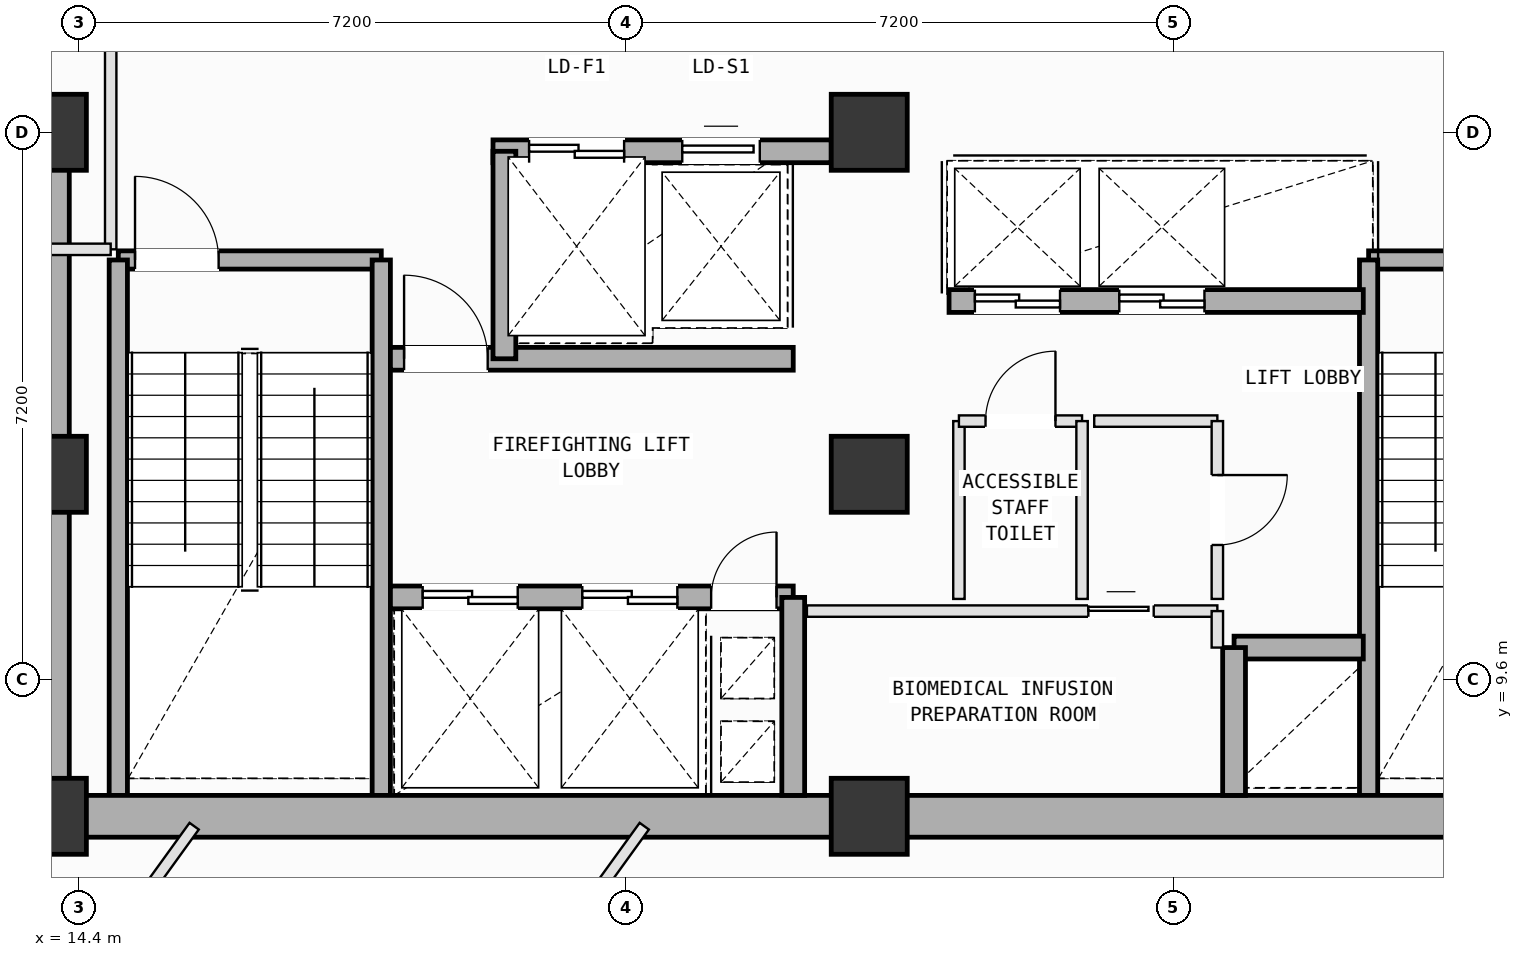
"""IFC4 building model, lengths in metres.
Left out: names, types, materials, properties, quantities, classifications, styles, units other than length and angle.
Written with IfcOpenShell. Run it as: python <this file> out.ifc"""

import sys

from ifc_helpers import new_model, si_unit, direction, frame, frame_2d, origin, origin_2d, place, context, subcontext, project, spatial, rectangle, extrude, element, fill, save


model = new_model("IFC4")
c1 = context("Model", 3, precision=1e-05, world=origin(), true_north=direction((0.0, 1.0)))
c2 = subcontext(c1, "Body", "Model", "MODEL_VIEW")
j1 = project(units=[si_unit("LENGTHUNIT", "METRE"), si_unit("PLANEANGLEUNIT", "RADIAN")], contexts=[c1])
p1 = place(None, origin())
s1 = spatial("IfcSite", under=j1, at=p1, CompositionType="ELEMENT")
p2 = place(p1, origin())
s2 = spatial("IfcBuilding", under=s1, at=p2, CompositionType="ELEMENT")
p3 = place(p2, frame((0.0, 0.0, 255.2)))
s3 = spatial("IfcBuildingStorey", under=s2, at=p3, CompositionType="ELEMENT", Elevation=255.2)
for number, where, z_axis, x_axis in (
    (1, (14.0, 7.8, 0.0), (0.0, 0.0, 1.0), (1.0, 0.0, 0.0)),
    (2, (14.0, 12.3, 0.0), (0.0, 0.0, 1.0), (1.0, 0.0, 0.0)),
    (3, (14.0, 16.8, 0.0), (0.0, 0.0, 1.0), (1.0, 0.0, 0.0)),
    (4, (24.8, 7.8, 0.0), (0.0, 0.0, 1.0), (1.0, 0.0, 0.0)),
    (5, (24.8, 12.3, 0.0), (0.0, 0.0, 1.0), (1.0, 0.0, 0.0)),
    (6, (24.8, 16.8, 0.0), (0.0, 0.0, 1.0), (1.0, 0.0, 0.0)),
):
    element("IfcColumn", number, at=place(p3, frame(where, z_axis=z_axis, x_axis=x_axis)), inside=s3, PredefinedType="COLUMN", context=c2, shape_type="SweptSolid", body=[
        extrude(rectangle(XDim=1.0, YDim=1.0, at=origin_2d()), origin(), (0.0, 0.0, 1.0), 4.0),
    ])
p4 = place(p3, frame((15.189, 4.237, 0.0), z_axis=(0.0, 0.0, 1.0), x_axis=(-0.810568140664, 0.585644336898, 0.0)))
e7 = element("IfcWall", 7, at=p4, inside=s3, PredefinedType="SOLIDWALL", context=c2, shape_type="SweptSolid", body=[
    extrude(rectangle(XDim=5.101, YDim=0.28, at=frame_2d((2.55, 0.0))), origin(), (0.0, 0.0, 1.0), 3.245),
])
p5 = place(p4, frame((2.644, 0.0, 0.75)))
e8 = element("IfcOpeningElement", 8, at=p5, cuts=e7, PredefinedType="OPENING", context=c2, shape_type="SweptSolid", body=[
    extrude(rectangle(XDim=1.6, YDim=1.95, at=frame_2d((0.8, 0.975))), frame((0.0, 0.15, 0.0), z_axis=(0.0, -1.0, 0.0), x_axis=(1.0, 0.0, 0.0)), (0.0, 0.0, 1.0), 0.3),
])
p6 = place(p3, frame((14.92, 15.12, 0.0), z_axis=(0.0, 0.0, 1.0), x_axis=(1.0, 0.0, 0.0)))
e9 = element("IfcWall", 9, at=p6, inside=s3, PredefinedType="SOLIDWALL", context=c2, shape_type="SweptSolid", body=[
    extrude(rectangle(XDim=3.46, YDim=0.24, at=frame_2d((1.73, 0.0))), origin(), (0.0, 0.0, 1.0), 3.78),
])
p7 = place(p6, frame((0.22, 0.0, 0.0)))
e10 = element("IfcOpeningElement", 10, at=p7, cuts=e9, PredefinedType="OPENING", context=c2, shape_type="SweptSolid", body=[
    extrude(rectangle(XDim=1.1, YDim=2.15, at=frame_2d((0.55, 1.075))), frame((0.0, 0.13, 0.0), z_axis=(0.0, -1.0, 0.0), x_axis=(1.0, 0.0, 0.0)), (0.0, 0.0, 1.0), 0.26),
])
for number, where, z_axis, x_axis in (
    (11, (18.38, 15.12, 0.0), (0.0, 0.0, 1.0), (0.0, -1.0, 0.0)),
    (12, (14.92, 8.075, 0.0), (0.0, 0.0, 1.0), (0.0, 1.0, 0.0)),
):
    element("IfcWall", number, at=place(p3, frame(where, z_axis=z_axis, x_axis=x_axis)), inside=s3, PredefinedType="SOLIDWALL", context=c2, shape_type="SweptSolid", body=[
        extrude(rectangle(XDim=7.045, YDim=0.24, at=frame_2d((3.522, 0.0))), origin(), (0.0, 0.0, 1.0), 3.78),
    ])
p8 = place(p3, frame((31.37, 15.12, 0.0), z_axis=(0.0, 0.0, 1.0), x_axis=(1.0, 0.0, 0.0)))
e13 = element("IfcWall", 13, at=p8, inside=s3, PredefinedType="SOLIDWALL", context=c2, shape_type="SweptSolid", body=[
    extrude(rectangle(XDim=3.46, YDim=0.24, at=frame_2d((1.73, 0.0))), origin(), (0.0, 0.0, 1.0), 3.78),
])
p9 = place(p8, frame((2.14, 0.0, 0.0)))
e14 = element("IfcOpeningElement", 14, at=p9, cuts=e13, PredefinedType="OPENING", context=c2, shape_type="SweptSolid", body=[
    extrude(rectangle(XDim=1.1, YDim=2.15, at=frame_2d((0.55, 1.075))), frame((0.0, 0.13, 0.0), z_axis=(0.0, -1.0, 0.0), x_axis=(1.0, 0.0, 0.0)), (0.0, 0.0, 1.0), 0.26),
])
p10 = place(p3, frame((31.37, 8.075, 0.0), z_axis=(0.0, 0.0, 1.0), x_axis=(0.0, 1.0, 0.0)))
e15 = element("IfcWall", 15, at=p10, inside=s3, PredefinedType="SOLIDWALL", context=c2, shape_type="SweptSolid", body=[
    extrude(rectangle(XDim=7.045, YDim=0.24, at=frame_2d((3.522, 0.0))), origin(), (0.0, 0.0, 1.0), 3.78),
])
for number, where, z_axis, x_axis in (
    (16, (14.0, 7.8, 0.0), (0.0, 0.0, 1.0), (1.0, 0.0, 0.0)),
    (17, (24.8, 7.8, 0.0), (0.0, 0.0, 1.0), (1.0, 0.0, 0.0)),
):
    element("IfcWall", number, at=place(p3, frame(where, z_axis=z_axis, x_axis=x_axis)), inside=s3, PredefinedType="SHEAR", context=c2, shape_type="SweptSolid", body=[
        extrude(rectangle(XDim=10.8, YDim=0.55, at=frame_2d((5.4, 0.0))), origin(), (0.0, 0.0, 1.0), 3.78),
    ])
p11 = place(p3, frame((14.0, 16.8, 0.0), z_axis=(0.0, 0.0, 1.0), x_axis=(0.0, -1.0, 0.0)))
e18 = element("IfcWall", 18, at=p11, inside=s3, PredefinedType="SHEAR", context=c2, shape_type="SweptSolid", body=[
    extrude(rectangle(XDim=9.0, YDim=0.55, at=frame_2d((4.5, 0.0))), origin(), (0.0, 0.0, 1.0), 3.78),
])
p12 = place(p3, frame((19.85, 16.55, 0.0), z_axis=(0.0, 0.0, 1.0), x_axis=(1.0, 0.0, 0.0)))
e19 = element("IfcWall", 19, at=p12, inside=s3, PredefinedType="SOLIDWALL", context=c2, shape_type="SweptSolid", body=[
    extrude(rectangle(XDim=4.45, YDim=0.3, at=frame_2d((2.225, 0.0))), origin(), (0.0, 0.0, 1.0), 3.78),
])
p13 = place(p12, frame((0.475, 0.0, 0.0)))
e20 = element("IfcOpeningElement", 20, at=p13, cuts=e19, PredefinedType="OPENING", context=c2, shape_type="SweptSolid", body=[
    extrude(rectangle(XDim=1.25, YDim=2.18, at=frame_2d((0.625, 1.09))), frame((0.0, 0.16, 0.0), z_axis=(0.0, -1.0, 0.0), x_axis=(1.0, 0.0, 0.0)), (0.0, 0.0, 1.0), 0.32),
])
p14 = place(p12, frame((2.49, 0.0, 0.0)))
e21 = element("IfcOpeningElement", 21, at=p14, cuts=e19, PredefinedType="OPENING", context=c2, shape_type="SweptSolid", body=[
    extrude(rectangle(XDim=1.02, YDim=2.12, at=frame_2d((0.51, 1.06))), frame((0.0, 0.16, 0.0), z_axis=(0.0, -1.0, 0.0), x_axis=(1.0, 0.0, 0.0)), (0.0, 0.0, 1.0), 0.32),
])
p15 = place(p3, frame((18.5, 10.68, 0.0), z_axis=(0.0, 0.0, 1.0), x_axis=(1.0, 0.0, 0.0)))
e22 = element("IfcWall", 22, at=p15, inside=s3, PredefinedType="SOLIDWALL", context=c2, shape_type="SweptSolid", body=[
    extrude(rectangle(XDim=5.3, YDim=0.3, at=frame_2d((2.65, 0.0))), origin(), (0.0, 0.0, 1.0), 3.78),
])
p16 = place(p15, frame((4.22, 0.0, 0.0)))
e23 = element("IfcOpeningElement", 23, at=p16, cuts=e22, PredefinedType="OPENING", context=c2, shape_type="SweptSolid", body=[
    extrude(rectangle(XDim=0.86, YDim=2.06, at=frame_2d((0.43, 1.03))), frame((0.0, 0.16, 0.0), z_axis=(0.0, -1.0, 0.0), x_axis=(1.0, 0.0, 0.0)), (0.0, 0.0, 1.0), 0.32),
])
p17 = place(p15, frame((0.425, 0.0, 0.0)))
e24 = element("IfcOpeningElement", 24, at=p17, cuts=e22, PredefinedType="OPENING", context=c2, shape_type="SweptSolid", body=[
    extrude(rectangle(XDim=1.25, YDim=2.18, at=frame_2d((0.625, 1.09))), frame((0.0, 0.16, 0.0), z_axis=(0.0, -1.0, 0.0), x_axis=(1.0, 0.0, 0.0)), (0.0, 0.0, 1.0), 0.32),
])
p18 = place(p15, frame((2.525, 0.0, 0.0)))
e25 = element("IfcOpeningElement", 25, at=p18, cuts=e22, PredefinedType="OPENING", context=c2, shape_type="SweptSolid", body=[
    extrude(rectangle(XDim=1.25, YDim=2.18, at=frame_2d((0.625, 1.09))), frame((0.0, 0.16, 0.0), z_axis=(0.0, -1.0, 0.0), x_axis=(1.0, 0.0, 0.0)), (0.0, 0.0, 1.0), 0.32),
])
p19 = place(p3, frame((18.5, 13.82, 0.0), z_axis=(0.0, 0.0, 1.0), x_axis=(1.0, 0.0, 0.0)))
e26 = element("IfcWall", 26, at=p19, inside=s3, PredefinedType="SOLIDWALL", context=c2, shape_type="SweptSolid", body=[
    extrude(rectangle(XDim=5.3, YDim=0.3, at=frame_2d((2.65, 0.0))), origin(), (0.0, 0.0, 1.0), 3.78),
])
p20 = place(p19, frame((0.18, 0.0, 0.0)))
e27 = element("IfcOpeningElement", 27, at=p20, cuts=e26, PredefinedType="OPENING", context=c2, shape_type="SweptSolid", body=[
    extrude(rectangle(XDim=1.1, YDim=2.15, at=frame_2d((0.55, 1.075))), frame((0.0, 0.16, 0.0), z_axis=(0.0, -1.0, 0.0), x_axis=(1.0, 0.0, 0.0)), (0.0, 0.0, 1.0), 0.32),
])
p21 = place(p3, frame((23.8, 8.075, 0.0), z_axis=(0.0, 0.0, 1.0), x_axis=(0.0, 1.0, 0.0)))
e28 = element("IfcWall", 28, at=p21, inside=s3, PredefinedType="SOLIDWALL", context=c2, shape_type="SweptSolid", body=[
    extrude(rectangle(XDim=2.605, YDim=0.3, at=frame_2d((1.302, 0.0))), origin(), (0.0, 0.0, 1.0), 3.78),
])
p22 = place(p3, frame((20.0, 13.82, 0.0), z_axis=(0.0, 0.0, 1.0), x_axis=(0.0, 1.0, 0.0)))
e29 = element("IfcWall", 29, at=p22, inside=s3, PredefinedType="SOLIDWALL", context=c2, shape_type="SweptSolid", body=[
    extrude(rectangle(XDim=2.73, YDim=0.3, at=frame_2d((1.365, 0.0))), origin(), (0.0, 0.0, 1.0), 3.78),
])
p23 = place(p3, frame((29.6, 10.02, 0.0), z_axis=(0.0, 0.0, 1.0), x_axis=(1.0, 0.0, 0.0)))
e30 = element("IfcWall", 30, at=p23, inside=s3, PredefinedType="SOLIDWALL", context=c2, shape_type="SweptSolid", body=[
    extrude(rectangle(XDim=1.7, YDim=0.3, at=frame_2d((0.85, 0.0))), origin(), (0.0, 0.0, 1.0), 3.78),
])
p24 = place(p3, frame((29.6, 8.075, 0.0), z_axis=(0.0, 0.0, 1.0), x_axis=(0.0, 1.0, 0.0)))
e31 = element("IfcWall", 31, at=p24, inside=s3, PredefinedType="SOLIDWALL", context=c2, shape_type="SweptSolid", body=[
    extrude(rectangle(XDim=1.945, YDim=0.3, at=frame_2d((0.973, 0.0))), origin(), (0.0, 0.0, 1.0), 3.78),
])
p25 = place(p3, frame((25.85, 14.58, 0.0), z_axis=(0.0, 0.0, 1.0), x_axis=(1.0, 0.0, 0.0)))
e32 = element("IfcWall", 32, at=p25, inside=s3, PredefinedType="SOLIDWALL", context=c2, shape_type="SweptSolid", body=[
    extrude(rectangle(XDim=5.45, YDim=0.3, at=frame_2d((2.725, 0.0))), origin(), (0.0, 0.0, 1.0), 3.78),
])
p26 = place(p25, frame((0.34, 0.0, 0.0)))
e33 = element("IfcOpeningElement", 33, at=p26, cuts=e32, PredefinedType="OPENING", context=c2, shape_type="SweptSolid", body=[
    extrude(rectangle(XDim=1.12, YDim=2.15, at=frame_2d((0.56, 1.075))), frame((0.0, 0.16, 0.0), z_axis=(0.0, -1.0, 0.0), x_axis=(1.0, 0.0, 0.0)), (0.0, 0.0, 1.0), 0.32),
])
p27 = place(p25, frame((2.24, 0.0, 0.0)))
e34 = element("IfcOpeningElement", 34, at=p27, cuts=e32, PredefinedType="OPENING", context=c2, shape_type="SweptSolid", body=[
    extrude(rectangle(XDim=1.12, YDim=2.15, at=frame_2d((0.56, 1.075))), frame((0.0, 0.16, 0.0), z_axis=(0.0, -1.0, 0.0), x_axis=(1.0, 0.0, 0.0)), (0.0, 0.0, 1.0), 0.32),
])
p28 = place(p3, frame((23.98, 10.5, 0.0), z_axis=(0.0, 0.0, 1.0), x_axis=(1.0, 0.0, 0.0)))
e35 = element("IfcWall", 35, at=p28, inside=s3, PredefinedType="PARTITIONING", context=c2, shape_type="SweptSolid", body=[
    extrude(rectangle(XDim=5.4, YDim=0.15, at=frame_2d((2.7, 0.0))), origin(), (0.0, 0.0, 1.0), 3.78),
])
p29 = place(p28, frame((3.703, 0.0, 0.0)))
e36 = element("IfcOpeningElement", 36, at=p29, cuts=e35, PredefinedType="OPENING", context=c2, shape_type="SweptSolid", body=[
    extrude(rectangle(XDim=0.86, YDim=2.06, at=frame_2d((0.43, 1.03))), frame((0.0, 0.085, 0.0), z_axis=(0.0, -1.0, 0.0), x_axis=(1.0, 0.0, 0.0)), (0.0, 0.0, 1.0), 0.17),
])
p30 = place(p3, frame((29.38, 10.5, 0.0), z_axis=(0.0, 0.0, 1.0), x_axis=(0.0, -1.0, 0.0)))
e37 = element("IfcWall", 37, at=p30, inside=s3, PredefinedType="PARTITIONING", context=c2, shape_type="SweptSolid", body=[
    extrude(rectangle(XDim=0.48, YDim=0.15, at=frame_2d((0.24, 0.0))), origin(), (0.0, 0.0, 1.0), 3.78),
])
p31 = place(p3, frame((25.98, 10.66, 0.0), z_axis=(0.0, 0.0, 1.0), x_axis=(0.0, 1.0, 0.0)))
e38 = element("IfcWall", 38, at=p31, inside=s3, PredefinedType="PARTITIONING", context=c2, shape_type="SweptSolid", body=[
    extrude(rectangle(XDim=2.34, YDim=0.15, at=frame_2d((1.17, 0.0))), origin(), (0.0, 0.0, 1.0), 3.78),
])
p32 = place(p3, frame((25.98, 13.0, 0.0), z_axis=(0.0, 0.0, 1.0), x_axis=(1.0, 0.0, 0.0)))
e39 = element("IfcWall", 39, at=p32, inside=s3, PredefinedType="PARTITIONING", context=c2, shape_type="SweptSolid", body=[
    extrude(rectangle(XDim=1.62, YDim=0.15, at=frame_2d((0.81, 0.0))), origin(), (0.0, 0.0, 1.0), 3.78),
])
p33 = place(p32, frame((0.35, 0.0, 0.0)))
e40 = element("IfcOpeningElement", 40, at=p33, cuts=e39, PredefinedType="OPENING", context=c2, shape_type="SweptSolid", body=[
    extrude(rectangle(XDim=0.92, YDim=2.1, at=frame_2d((0.46, 1.05))), frame((0.0, 0.085, 0.0), z_axis=(0.0, -1.0, 0.0), x_axis=(1.0, 0.0, 0.0)), (0.0, 0.0, 1.0), 0.17),
])
p34 = place(p3, frame((27.6, 13.0, 0.0), z_axis=(0.0, 0.0, 1.0), x_axis=(0.0, -1.0, 0.0)))
e41 = element("IfcWall", 41, at=p34, inside=s3, PredefinedType="PARTITIONING", context=c2, shape_type="SweptSolid", body=[
    extrude(rectangle(XDim=2.34, YDim=0.15, at=frame_2d((1.17, 0.0))), origin(), (0.0, 0.0, 1.0), 3.78),
])
p35 = place(p3, frame((27.76, 13.0, 0.0), z_axis=(0.0, 0.0, 1.0), x_axis=(1.0, 0.0, 0.0)))
e42 = element("IfcWall", 42, at=p35, inside=s3, PredefinedType="PARTITIONING", context=c2, shape_type="SweptSolid", body=[
    extrude(rectangle(XDim=1.62, YDim=0.15, at=frame_2d((0.81, 0.0))), origin(), (0.0, 0.0, 1.0), 3.78),
])
p36 = place(p3, frame((29.38, 13.0, 0.0), z_axis=(0.0, 0.0, 1.0), x_axis=(0.0, -1.0, 0.0)))
e43 = element("IfcWall", 43, at=p36, inside=s3, PredefinedType="PARTITIONING", context=c2, shape_type="SweptSolid", body=[
    extrude(rectangle(XDim=2.34, YDim=0.15, at=frame_2d((1.17, 0.0))), origin(), (0.0, 0.0, 1.0), 3.78),
])
p37 = place(p36, frame((0.71, 0.0, 0.0)))
e44 = element("IfcOpeningElement", 44, at=p37, cuts=e43, PredefinedType="OPENING", context=c2, shape_type="SweptSolid", body=[
    extrude(rectangle(XDim=0.92, YDim=2.1, at=frame_2d((0.46, 1.05))), frame((0.0, 0.085, 0.0), z_axis=(0.0, -1.0, 0.0), x_axis=(1.0, 0.0, 0.0)), (0.0, 0.0, 1.0), 0.17),
])
p38 = place(p3, frame((33.363, 7.5, 0.0), z_axis=(0.0, 0.0, 1.0), x_axis=(-0.585650908252, -0.810563392748, 0.0)))
e45 = element("IfcWall", 45, at=p38, inside=s3, PredefinedType="PARTITIONING", context=c2, shape_type="SweptSolid", body=[
    extrude(rectangle(XDim=13.174, YDim=0.15, at=frame_2d((6.587, 0.0))), origin(), (0.0, 0.0, 1.0), 3.78),
])
p39 = place(p3, frame((19.768, 4.803, 0.0), z_axis=(0.0, 0.0, 1.0), x_axis=(0.585760155667, 0.810484447743, 0.0)))
e46 = element("IfcWall", 46, at=p39, inside=s3, PredefinedType="PARTITIONING", context=c2, shape_type="SweptSolid", body=[
    extrude(rectangle(XDim=3.537, YDim=0.15, at=frame_2d((1.769, 0.0))), origin(), (0.0, 0.0, 1.0), 3.78),
])
p40 = place(p39, frame((1.234, 0.0, 0.0)))
e47 = element("IfcOpeningElement", 47, at=p40, cuts=e46, PredefinedType="OPENING", context=c2, shape_type="SweptSolid", body=[
    extrude(rectangle(XDim=0.86, YDim=2.06, at=frame_2d((0.43, 1.03))), frame((0.0, 0.085, 0.0), z_axis=(0.0, -1.0, 0.0), x_axis=(1.0, 0.0, 0.0)), (0.0, 0.0, 1.0), 0.17),
])
p41 = place(p3, frame((14.105, 5.162, 0.0), z_axis=(0.0, 0.0, 1.0), x_axis=(0.585870719432, 0.810404528684, 0.0)))
e48 = element("IfcWall", 48, at=p41, inside=s3, PredefinedType="PARTITIONING", context=c2, shape_type="SweptSolid", body=[
    extrude(rectangle(XDim=3.094, YDim=0.15, at=frame_2d((1.547, 0.0))), origin(), (0.0, 0.0, 1.0), 3.78),
])
p42 = place(p41, frame((0.529, 0.0, 0.0)))
e49 = element("IfcOpeningElement", 49, at=p42, cuts=e48, PredefinedType="OPENING", context=c2, shape_type="SweptSolid", body=[
    extrude(rectangle(XDim=0.86, YDim=2.06, at=frame_2d((0.43, 1.03))), frame((0.0, 0.085, 0.0), z_axis=(0.0, -1.0, 0.0), x_axis=(1.0, 0.0, 0.0)), (0.0, 0.0, 1.0), 0.17),
])
p43 = place(p3, frame((14.82, 18.2, 0.0), z_axis=(0.0, 0.0, 1.0), x_axis=(0.0, -1.0, 0.0)))
e50 = element("IfcWall", 50, at=p43, inside=s3, PredefinedType="PARTITIONING", context=c2, shape_type="SweptSolid", body=[
    extrude(rectangle(XDim=2.94, YDim=0.15, at=frame_2d((1.47, 0.0))), origin(), (0.0, 0.0, 1.0), 3.78),
])
p44 = place(p3, frame((14.82, 15.26, 0.0), z_axis=(0.0, 0.0, 1.0), x_axis=(-1.0, 0.0, 0.0)))
e51 = element("IfcWall", 51, at=p44, inside=s3, PredefinedType="PARTITIONING", context=c2, shape_type="SweptSolid", body=[
    extrude(rectangle(XDim=1.12, YDim=0.15, at=frame_2d((0.56, 0.0))), origin(), (0.0, 0.0, 1.0), 3.78),
])
p45 = place(p3, frame((6.324, 10.784, 0.0), z_axis=(0.0, 0.0, 1.0), x_axis=(0.585687308948, 0.810537091155, 0.0)))
e52 = element("IfcWall", 52, at=p45, inside=s3, PredefinedType="PARTITIONING", context=c2, shape_type="SweptSolid", body=[
    extrude(rectangle(XDim=13.635, YDim=0.15, at=frame_2d((6.818, 0.0))), origin(), (0.0, 0.0, 1.0), 3.78),
])
p46 = place(p7, origin())
e53 = element("IfcDoor", 53, at=p46, inside=s3, OperationType="SINGLE_SWING_LEFT", PredefinedType="DOOR", context=c2, shape_type="SweptSolid", body=[
    extrude(rectangle(XDim=1.1, YDim=2.15, at=frame_2d((0.55, 1.075))), frame((0.0, 0.025, 0.0), z_axis=(0.0, -1.0, 0.0), x_axis=(1.0, 0.0, 0.0)), (0.0, 0.0, 1.0), 0.05),
])
fill(e10, e53)
p47 = place(p16, origin())
e54 = element("IfcDoor", 54, at=p47, inside=s3, OperationType="SINGLE_SWING_RIGHT", PredefinedType="DOOR", context=c2, shape_type="SweptSolid", body=[
    extrude(rectangle(XDim=0.86, YDim=2.06, at=frame_2d((0.43, 1.03))), frame((0.0, 0.025, 0.0), z_axis=(0.0, -1.0, 0.0), x_axis=(1.0, 0.0, 0.0)), (0.0, 0.0, 1.0), 0.05),
])
fill(e23, e54)
p48 = place(p20, origin())
e55 = element("IfcDoor", 55, at=p48, inside=s3, OperationType="SINGLE_SWING_LEFT", PredefinedType="DOOR", context=c2, shape_type="SweptSolid", body=[
    extrude(rectangle(XDim=1.1, YDim=2.15, at=frame_2d((0.55, 1.075))), frame((0.0, 0.025, 0.0), z_axis=(0.0, -1.0, 0.0), x_axis=(1.0, 0.0, 0.0)), (0.0, 0.0, 1.0), 0.05),
])
fill(e27, e55)
p49 = place(p17, origin())
e56 = element("IfcDoor", 56, at=p49, inside=s3, OperationType="DOUBLE_DOOR_SLIDING", PredefinedType="DOOR", context=c2, shape_type="SweptSolid", body=[
    extrude(rectangle(XDim=1.25, YDim=2.18, at=frame_2d((0.625, 1.09))), frame((0.0, 0.025, 0.0), z_axis=(0.0, -1.0, 0.0), x_axis=(1.0, 0.0, 0.0)), (0.0, 0.0, 1.0), 0.05),
])
fill(e24, e56)
p50 = place(p18, origin())
e57 = element("IfcDoor", 57, at=p50, inside=s3, OperationType="DOUBLE_DOOR_SLIDING", PredefinedType="DOOR", context=c2, shape_type="SweptSolid", body=[
    extrude(rectangle(XDim=1.25, YDim=2.18, at=frame_2d((0.625, 1.09))), frame((0.0, 0.025, 0.0), z_axis=(0.0, -1.0, 0.0), x_axis=(1.0, 0.0, 0.0)), (0.0, 0.0, 1.0), 0.05),
])
fill(e25, e57)
p51 = place(p26, origin())
e58 = element("IfcDoor", 58, at=p51, inside=s3, OperationType="DOUBLE_DOOR_SLIDING", PredefinedType="DOOR", context=c2, shape_type="SweptSolid", body=[
    extrude(rectangle(XDim=1.12, YDim=2.15, at=frame_2d((0.56, 1.075))), frame((0.0, 0.025, 0.0), z_axis=(0.0, -1.0, 0.0), x_axis=(1.0, 0.0, 0.0)), (0.0, 0.0, 1.0), 0.05),
])
fill(e33, e58)
p52 = place(p27, origin())
e59 = element("IfcDoor", 59, at=p52, inside=s3, OperationType="DOUBLE_DOOR_SLIDING", PredefinedType="DOOR", context=c2, shape_type="SweptSolid", body=[
    extrude(rectangle(XDim=1.12, YDim=2.15, at=frame_2d((0.56, 1.075))), frame((0.0, 0.025, 0.0), z_axis=(0.0, -1.0, 0.0), x_axis=(1.0, 0.0, 0.0)), (0.0, 0.0, 1.0), 0.05),
])
fill(e34, e59)
p53 = place(p13, origin())
e60 = element("IfcDoor", 60, at=p53, inside=s3, OperationType="DOUBLE_DOOR_SLIDING", PredefinedType="DOOR", context=c2, shape_type="SweptSolid", body=[
    extrude(rectangle(XDim=1.25, YDim=2.18, at=frame_2d((0.625, 1.09))), frame((0.0, 0.025, 0.0), z_axis=(0.0, -1.0, 0.0), x_axis=(1.0, 0.0, 0.0)), (0.0, 0.0, 1.0), 0.05),
])
fill(e20, e60)
p54 = place(p14, origin())
e61 = element("IfcDoor", 61, at=p54, inside=s3, OperationType="SLIDING_TO_LEFT", PredefinedType="DOOR", context=c2, shape_type="SweptSolid", body=[
    extrude(rectangle(XDim=1.02, YDim=2.12, at=frame_2d((0.51, 1.06))), frame((0.0, 0.025, 0.0), z_axis=(0.0, -1.0, 0.0), x_axis=(1.0, 0.0, 0.0)), (0.0, 0.0, 1.0), 0.05),
])
fill(e21, e61)
p55 = place(p33, origin())
e62 = element("IfcDoor", 62, at=p55, inside=s3, OperationType="SINGLE_SWING_RIGHT", PredefinedType="DOOR", context=c2, shape_type="SweptSolid", body=[
    extrude(rectangle(XDim=0.92, YDim=2.1, at=frame_2d((0.46, 1.05))), frame((0.0, 0.025, 0.0), z_axis=(0.0, -1.0, 0.0), x_axis=(1.0, 0.0, 0.0)), (0.0, 0.0, 1.0), 0.05),
])
fill(e40, e62)
p56 = place(p37, origin())
e63 = element("IfcDoor", 63, at=p56, inside=s3, OperationType="SINGLE_SWING_LEFT", PredefinedType="DOOR", context=c2, shape_type="SweptSolid", body=[
    extrude(rectangle(XDim=0.92, YDim=2.1, at=frame_2d((0.46, 1.05))), frame((0.0, 0.025, 0.0), z_axis=(0.0, -1.0, 0.0), x_axis=(1.0, 0.0, 0.0)), (0.0, 0.0, 1.0), 0.05),
])
fill(e44, e63)
p57 = place(p29, origin())
e64 = element("IfcDoor", 64, at=p57, inside=s3, OperationType="SLIDING_TO_LEFT", PredefinedType="DOOR", context=c2, shape_type="SweptSolid", body=[
    extrude(rectangle(XDim=0.86, YDim=2.06, at=frame_2d((0.43, 1.03))), frame((0.0, 0.025, 0.0), z_axis=(0.0, -1.0, 0.0), x_axis=(1.0, 0.0, 0.0)), (0.0, 0.0, 1.0), 0.05),
])
fill(e36, e64)
save(model, sys.argv[1])
